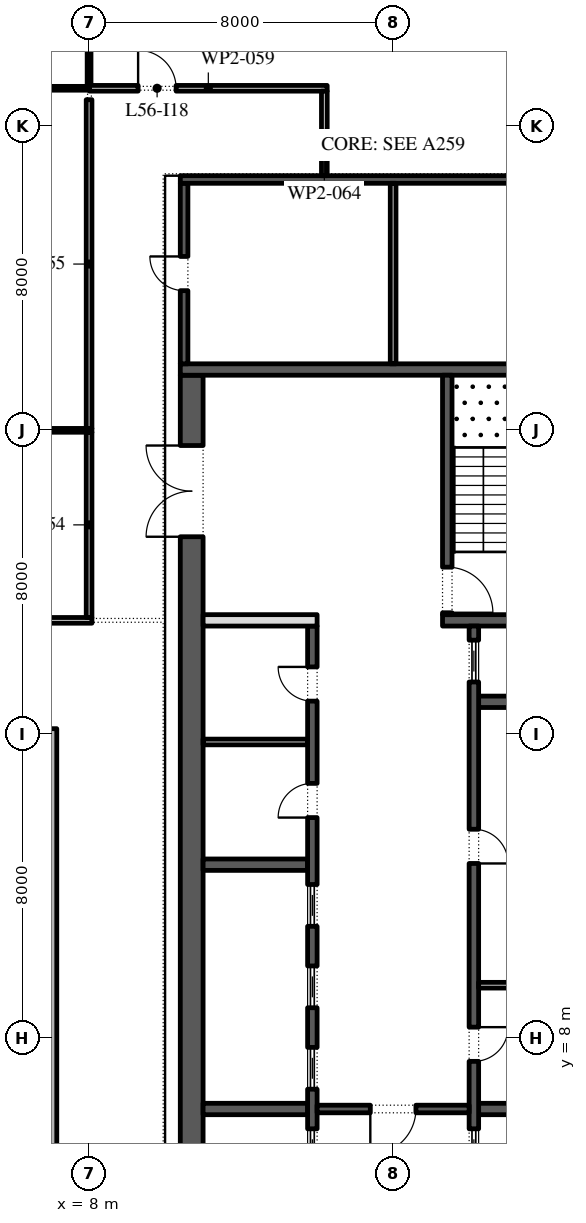
"""IFC4 building model, lengths in metres.
Left out: names, types, materials, properties, quantities, classifications, styles, units other than length and angle.
Written with IfcOpenShell. Run it as: python <this file> out.ifc"""

import sys

from ifc_helpers import new_model, si_unit, direction, frame, frame_2d, origin, place, context, subcontext, project, spatial, polyline, rectangle, outline, extrude, element, fill, save


model = new_model("IFC4")
c1 = context("Model", 3, precision=1e-05, world=origin(), true_north=direction((0.0, 1.0)))
c2 = subcontext(c1, "Body", "Model", "MODEL_VIEW")
j1 = project(units=[si_unit("LENGTHUNIT", "METRE"), si_unit("PLANEANGLEUNIT", "RADIAN")], contexts=[c1])
p1 = place(None, origin())
s1 = spatial("IfcSite", under=j1, at=p1, CompositionType="ELEMENT")
p2 = place(p1, origin())
s2 = spatial("IfcBuilding", under=s1, at=p2, CompositionType="ELEMENT")
p3 = place(p2, frame((0.0, 0.0, 259.8)))
s3 = spatial("IfcBuildingStorey", under=s2, at=p3, CompositionType="ELEMENT", Elevation=259.8)
p4 = place(p3, origin())
e1 = element("IfcWall", 1, at=p4, inside=s3, PredefinedType="STANDARD", context=c2, shape_type="SweptSolid", body=[
    extrude(outline(polyline([(-7.15, -2.15), (7.15, -2.15), (7.15, 16.15), (-7.15, 16.15), (-7.15, -2.15)]), holes=[polyline([(-7.0, -2.0), (-7.0, 16.0), (7.0, 16.0), (7.0, -2.0), (-7.0, -2.0)])]), origin(), (0.0, 0.0, 1.0), 4.0),
])
p5 = place(p3, frame((10.7, -2.45, 0.0), z_axis=(0.0, 0.0, 1.0), x_axis=(0.0, 1.0, 0.0)))
e2 = element("IfcWall", 2, at=p5, inside=s3, PredefinedType="SHEAR", context=c2, shape_type="SweptSolid", body=[
    extrude(rectangle(XDim=27.9, YDim=0.6, at=frame_2d((13.95, 0.0))), origin(), (0.0, 0.0, 1.0), 4.0),
])
p6 = place(p5, frame((23.65, 0.0, 0.0)))
e3 = element("IfcOpeningElement", 3, at=p6, cuts=e2, PredefinedType="OPENING", context=c2, shape_type="SweptSolid", body=[
    extrude(rectangle(XDim=2.4, YDim=2.1, at=frame_2d((1.2, 1.05))), frame((0.0, 0.31, 0.0), z_axis=(0.0, -1.0, 0.0), x_axis=(1.0, 0.0, 0.0)), (0.0, 0.0, 1.0), 0.62),
])
p7 = place(p5, frame((1.087, 0.0, 0.0)))
e4 = element("IfcOpeningElement", 4, at=p7, cuts=e2, PredefinedType="OPENING", context=c2, shape_type="SweptSolid", body=[
    extrude(rectangle(XDim=0.9, YDim=2.1, at=frame_2d((0.45, 1.05))), frame((0.0, 0.31, 0.0), z_axis=(0.0, -1.0, 0.0), x_axis=(1.0, 0.0, 0.0)), (0.0, 0.0, 1.0), 0.62),
])
p8 = place(p5, frame((4.262, 0.0, 0.0)))
e5 = element("IfcOpeningElement", 5, at=p8, cuts=e2, PredefinedType="OPENING", context=c2, shape_type="SweptSolid", body=[
    extrude(rectangle(XDim=1.0, YDim=2.1, at=frame_2d((0.5, 1.05))), frame((0.0, 0.31, 0.0), z_axis=(0.0, -1.0, 0.0), x_axis=(1.0, 0.0, 0.0)), (0.0, 0.0, 1.0), 0.62),
])
p9 = place(p3, frame((10.4, 25.6, 0.0), z_axis=(0.0, 0.0, 1.0), x_axis=(1.0, 0.0, 0.0)))
e6 = element("IfcWall", 6, at=p9, inside=s3, PredefinedType="SHEAR", context=c2, shape_type="SweptSolid", body=[
    extrude(rectangle(XDim=11.2, YDim=0.3, at=frame_2d((5.6, 0.0))), origin(), (0.0, 0.0, 1.0), 4.0),
])
p10 = place(p3, frame((17.3, 19.0, 0.0), z_axis=(0.0, 0.0, 1.0), x_axis=(1.0, 0.0, 0.0)))
e7 = element("IfcWall", 7, at=p10, inside=s3, PredefinedType="SHEAR", context=c2, shape_type="SweptSolid", body=[
    extrude(rectangle(XDim=3.7, YDim=0.3, at=frame_2d((1.85, 0.0))), origin(), (0.0, 0.0, 1.0), 4.0),
])
p11 = place(p3, frame((17.425, 19.15, 0.0), z_axis=(0.0, 0.0, 1.0), x_axis=(0.0, 1.0, 0.0)))
e8 = element("IfcWall", 8, at=p11, inside=s3, PredefinedType="SHEAR", context=c2, shape_type="SweptSolid", body=[
    extrude(rectangle(XDim=6.3, YDim=0.25, at=frame_2d((3.15, 0.0))), origin(), (0.0, 0.0, 1.0), 4.0),
])
p12 = place(p11, frame((0.05, 0.0, 0.0)))
e9 = element("IfcOpeningElement", 9, at=p12, cuts=e8, PredefinedType="OPENING", context=c2, shape_type="SweptSolid", body=[
    extrude(rectangle(XDim=1.2, YDim=2.1, at=frame_2d((0.6, 1.05))), frame((0.0, 0.135, 0.0), z_axis=(0.0, -1.0, 0.0), x_axis=(1.0, 0.0, 0.0)), (0.0, 0.0, 1.0), 0.27),
])
for number, where, z_axis, x_axis in (
    (10, (18.25, 6.143, 0.0), (0.0, 0.0, 1.0), (1.0, 0.0, 0.0)),
    (11, (18.25, 16.857, 0.0), (0.0, 0.0, 1.0), (1.0, 0.0, 0.0)),
):
    element("IfcWall", number, at=place(p3, frame(where, z_axis=z_axis, x_axis=x_axis)), inside=s3, PredefinedType="SHEAR", context=c2, shape_type="SweptSolid", body=[
        extrude(rectangle(XDim=2.75, YDim=0.3, at=frame_2d((1.375, 0.0))), origin(), (0.0, 0.0, 1.0), 4.0),
    ])
p13 = place(p3, frame((18.125, 4.15, 0.0), z_axis=(0.0, 0.0, 1.0), x_axis=(0.0, 1.0, 0.0)))
e12 = element("IfcWall", 12, at=p13, inside=s3, PredefinedType="SHEAR", context=c2, shape_type="SweptSolid", body=[
    extrude(rectangle(XDim=14.7, YDim=0.25, at=frame_2d((7.35, 0.0))), origin(), (0.0, 0.0, 1.0), 4.0),
])
p14 = place(p13, frame((3.246, 0.0, 0.0)))
e13 = element("IfcOpeningElement", 13, at=p14, cuts=e12, PredefinedType="OPENING", context=c2, shape_type="SweptSolid", body=[
    extrude(rectangle(XDim=0.9, YDim=2.1, at=frame_2d((0.45, 1.05))), frame((0.0, 0.135, 0.0), z_axis=(0.0, -1.0, 0.0), x_axis=(1.0, 0.0, 0.0)), (0.0, 0.0, 1.0), 0.27),
])
p15 = place(p13, frame((8.454, 0.0, 0.0)))
e14 = element("IfcOpeningElement", 14, at=p15, cuts=e12, PredefinedType="OPENING", context=c2, shape_type="SweptSolid", body=[
    extrude(rectangle(XDim=0.9, YDim=2.1, at=frame_2d((0.45, 1.05))), frame((0.0, 0.135, 0.0), z_axis=(0.0, -1.0, 0.0), x_axis=(1.0, 0.0, 0.0)), (0.0, 0.0, 1.0), 0.27),
])
p16 = place(p13, frame((0.371, 0.0, 0.0)))
e15 = element("IfcOpeningElement", 15, at=p16, cuts=e12, PredefinedType="OPENING", context=c2, shape_type="SweptSolid", body=[
    extrude(rectangle(XDim=1.1, YDim=2.1, at=frame_2d((0.55, 1.05))), frame((0.0, 0.135, 0.0), z_axis=(0.0, -1.0, 0.0), x_axis=(1.0, 0.0, 0.0)), (0.0, 0.0, 1.0), 0.27),
])
p17 = place(p13, frame((13.229, 0.0, 0.0)))
e16 = element("IfcOpeningElement", 16, at=p17, cuts=e12, PredefinedType="OPENING", context=c2, shape_type="SweptSolid", body=[
    extrude(rectangle(XDim=1.1, YDim=2.1, at=frame_2d((0.55, 1.05))), frame((0.0, 0.135, 0.0), z_axis=(0.0, -1.0, 0.0), x_axis=(1.0, 0.0, 0.0)), (0.0, 0.0, 1.0), 0.27),
])
p18 = place(p3, frame((18.25, 9.4, 0.0), z_axis=(0.0, 0.0, 1.0), x_axis=(1.0, 0.0, 0.0)))
e17 = element("IfcWall", 17, at=p18, inside=s3, PredefinedType="PARTITIONING", context=c2, shape_type="SweptSolid", body=[
    extrude(rectangle(XDim=2.75, YDim=0.15, at=frame_2d((1.375, 0.0))), origin(), (0.0, 0.0, 1.0), 4.0),
])
for number, where, z_axis, x_axis in (
    (18, (11.0, 6.143, 0.0), (0.0, 0.0, 1.0), (1.0, 0.0, 0.0)),
    (19, (11.0, 12.571, 0.0), (0.0, 0.0, 1.0), (1.0, 0.0, 0.0)),
):
    element("IfcWall", number, at=place(p3, frame(where, z_axis=z_axis, x_axis=x_axis)), inside=s3, PredefinedType="SHEAR", context=c2, shape_type="SweptSolid", body=[
        extrude(rectangle(XDim=2.75, YDim=0.3, at=frame_2d((1.375, 0.0))), origin(), (0.0, 0.0, 1.0), 4.0),
    ])
p19 = place(p3, frame((13.875, -2.45, 0.0), z_axis=(0.0, 0.0, 1.0), x_axis=(0.0, 1.0, 0.0)))
e20 = element("IfcWall", 20, at=p19, inside=s3, PredefinedType="SHEAR", context=c2, shape_type="SweptSolid", body=[
    extrude(rectangle(XDim=21.3, YDim=0.25, at=frame_2d((10.65, 0.0))), origin(), (0.0, 0.0, 1.0), 4.0),
])
p20 = place(p19, frame((16.261, 0.0, 0.0)))
e21 = element("IfcOpeningElement", 21, at=p20, cuts=e20, PredefinedType="OPENING", context=c2, shape_type="SweptSolid", body=[
    extrude(rectangle(XDim=0.9, YDim=2.1, at=frame_2d((0.45, 1.05))), frame((0.0, 0.135, 0.0), z_axis=(0.0, -1.0, 0.0), x_axis=(1.0, 0.0, 0.0)), (0.0, 0.0, 1.0), 0.27),
])
p21 = place(p19, frame((19.325, 0.0, 0.0)))
e22 = element("IfcOpeningElement", 22, at=p21, cuts=e20, PredefinedType="OPENING", context=c2, shape_type="SweptSolid", body=[
    extrude(rectangle(XDim=0.9, YDim=2.1, at=frame_2d((0.45, 1.05))), frame((0.0, 0.135, 0.0), z_axis=(0.0, -1.0, 0.0), x_axis=(1.0, 0.0, 0.0)), (0.0, 0.0, 1.0), 0.27),
])
p22 = place(p19, frame((6.971, 0.0, 0.0)))
e23 = element("IfcOpeningElement", 23, at=p22, cuts=e20, PredefinedType="OPENING", context=c2, shape_type="SweptSolid", body=[
    extrude(rectangle(XDim=1.1, YDim=2.1, at=frame_2d((0.55, 1.05))), frame((0.0, 0.135, 0.0), z_axis=(0.0, -1.0, 0.0), x_axis=(1.0, 0.0, 0.0)), (0.0, 0.0, 1.0), 0.27),
])
p23 = place(p19, frame((9.114, 0.0, 0.0)))
e24 = element("IfcOpeningElement", 24, at=p23, cuts=e20, PredefinedType="OPENING", context=c2, shape_type="SweptSolid", body=[
    extrude(rectangle(XDim=1.1, YDim=2.1, at=frame_2d((0.55, 1.05))), frame((0.0, 0.135, 0.0), z_axis=(0.0, -1.0, 0.0), x_axis=(1.0, 0.0, 0.0)), (0.0, 0.0, 1.0), 0.27),
])
p24 = place(p19, frame((11.257, 0.0, 0.0)))
e25 = element("IfcOpeningElement", 25, at=p24, cuts=e20, PredefinedType="OPENING", context=c2, shape_type="SweptSolid", body=[
    extrude(rectangle(XDim=1.1, YDim=2.1, at=frame_2d((0.55, 1.05))), frame((0.0, 0.135, 0.0), z_axis=(0.0, -1.0, 0.0), x_axis=(1.0, 0.0, 0.0)), (0.0, 0.0, 1.0), 0.27),
])
p25 = place(p19, frame((13.4, 0.0, 0.0)))
e26 = element("IfcOpeningElement", 26, at=p25, cuts=e20, PredefinedType="OPENING", context=c2, shape_type="SweptSolid", body=[
    extrude(rectangle(XDim=1.1, YDim=2.1, at=frame_2d((0.55, 1.05))), frame((0.0, 0.135, 0.0), z_axis=(0.0, -1.0, 0.0), x_axis=(1.0, 0.0, 0.0)), (0.0, 0.0, 1.0), 0.27),
])
p26 = place(p3, frame((11.0, 19.0, 0.0), z_axis=(0.0, 0.0, 1.0), x_axis=(1.0, 0.0, 0.0)))
e27 = element("IfcWall", 27, at=p26, inside=s3, PredefinedType="PARTITIONING", context=c2, shape_type="SweptSolid", body=[
    extrude(rectangle(XDim=3.0, YDim=0.3, at=frame_2d((1.5, 0.0))), origin(), (0.0, 0.0, 1.0), 4.0),
])
p27 = place(p3, frame((11.0, 15.8, 0.0), z_axis=(0.0, 0.0, 1.0), x_axis=(1.0, 0.0, 0.0)))
e28 = element("IfcWall", 28, at=p27, inside=s3, PredefinedType="PARTITIONING", context=c2, shape_type="SweptSolid", body=[
    extrude(rectangle(XDim=2.75, YDim=0.15, at=frame_2d((1.375, 0.0))), origin(), (0.0, 0.0, 1.0), 4.0),
])
p28 = place(p3, frame((14.0, 6.143, 0.0), z_axis=(0.0, 0.0, 1.0), x_axis=(1.0, 0.0, 0.0)))
e29 = element("IfcWall", 29, at=p28, inside=s3, PredefinedType="SHEAR", context=c2, shape_type="SweptSolid", body=[
    extrude(rectangle(XDim=4.0, YDim=0.2, at=frame_2d((2.0, 0.0))), origin(), (0.0, 0.0, 1.0), 4.0),
])
p29 = place(p28, frame((1.4, 0.0, 0.0)))
e30 = element("IfcOpeningElement", 30, at=p29, cuts=e29, PredefinedType="OPENING", context=c2, shape_type="SweptSolid", body=[
    extrude(rectangle(XDim=1.2, YDim=2.1, at=frame_2d((0.6, 1.05))), frame((0.0, 0.11, 0.0), z_axis=(0.0, -1.0, 0.0), x_axis=(1.0, 0.0, 0.0)), (0.0, 0.0, 1.0), 0.22),
])
p30 = place(p3, frame((10.5, 25.75, 0.0), z_axis=(0.0, 0.0, 1.0), x_axis=(0.0, 1.0, 0.0)))
e31 = element("IfcWall", 31, at=p30, inside=s3, PredefinedType="SHEAR", context=c2, shape_type="SweptSolid", body=[
    extrude(rectangle(XDim=4.75, YDim=0.2, at=frame_2d((2.375, 0.0))), origin(), (0.0, 0.0, 1.0), 4.0),
])
p31 = place(p30, frame((1.925, 0.0, 0.0)))
e32 = element("IfcOpeningElement", 32, at=p31, cuts=e31, PredefinedType="OPENING", context=c2, shape_type="SweptSolid", body=[
    extrude(rectangle(XDim=0.9, YDim=2.1, at=frame_2d((0.45, 1.05))), frame((0.0, 0.11, 0.0), z_axis=(0.0, -1.0, 0.0), x_axis=(1.0, 0.0, 0.0)), (0.0, 0.0, 1.0), 0.22),
])
p32 = place(p3, frame((10.4, 30.6, 0.0), z_axis=(0.0, 0.0, 1.0), x_axis=(1.0, 0.0, 0.0)))
e33 = element("IfcWall", 33, at=p32, inside=s3, PredefinedType="SHEAR", context=c2, shape_type="SweptSolid", body=[
    extrude(rectangle(XDim=11.2, YDim=0.2, at=frame_2d((5.6, 0.0))), origin(), (0.0, 0.0, 1.0), 4.0),
])
p33 = place(p3, frame((16.0, 25.75, 0.0), z_axis=(0.0, 0.0, 1.0), x_axis=(0.0, 1.0, 0.0)))
e34 = element("IfcWall", 34, at=p33, inside=s3, PredefinedType="PARTITIONING", context=c2, shape_type="SweptSolid", body=[
    extrude(rectangle(XDim=4.75, YDim=0.15, at=frame_2d((2.375, 0.0))), origin(), (0.0, 0.0, 1.0), 4.0),
])
p34 = place(p3, frame((1.025, 19.0, 0.0), z_axis=(0.0, 0.0, 1.0), x_axis=(1.0, 0.0, 0.0)))
e35 = element("IfcWall", 35, at=p34, inside=s3, PredefinedType="PARTITIONING", context=c2, shape_type="SweptSolid", body=[
    extrude(rectangle(XDim=7.05, YDim=0.15, at=frame_2d((3.525, 0.0))), origin(), (0.0, 0.0, 1.0), 4.0),
])
p35 = place(p34, frame((3.825, 0.0, 0.0)))
e36 = element("IfcOpeningElement", 36, at=p35, cuts=e35, PredefinedType="OPENING", context=c2, shape_type="SweptSolid", body=[
    extrude(rectangle(XDim=1.0, YDim=2.1, at=frame_2d((0.5, 1.05))), frame((0.0, 0.085, 0.0), z_axis=(0.0, -1.0, 0.0), x_axis=(1.0, 0.0, 0.0)), (0.0, 0.0, 1.0), 0.17),
])
p36 = place(p3, frame((1.175, 24.0, 0.0), z_axis=(0.0, 0.0, 1.0), x_axis=(1.0, 0.0, 0.0)))
e37 = element("IfcWall", 37, at=p36, inside=s3, PredefinedType="PARTITIONING", context=c2, shape_type="SweptSolid", body=[
    extrude(rectangle(XDim=6.9, YDim=0.1, at=frame_2d((3.45, 0.0))), origin(), (0.0, 0.0, 1.0), 4.0),
])
p37 = place(p3, frame((8.0, 19.075, 0.0), z_axis=(0.0, 0.0, 1.0), x_axis=(0.0, 1.0, 0.0)))
e38 = element("IfcWall", 38, at=p37, inside=s3, PredefinedType="PARTITIONING", context=c2, shape_type="SweptSolid", body=[
    extrude(rectangle(XDim=4.875, YDim=0.15, at=frame_2d((2.438, 0.0))), origin(), (0.0, 0.0, 1.0), 4.0),
])
p38 = place(p3, frame((8.0, 24.05, 0.0), z_axis=(0.0, 0.0, 1.0), x_axis=(0.0, 1.0, 0.0)))
e39 = element("IfcWall", 39, at=p38, inside=s3, PredefinedType="PARTITIONING", context=c2, shape_type="SweptSolid", body=[
    extrude(rectangle(XDim=8.65, YDim=0.15, at=frame_2d((4.325, 0.0))), origin(), (0.0, 0.0, 1.0), 4.0),
])
p39 = place(p3, frame((8.05, 33.0, 0.0), z_axis=(0.0, 0.0, 1.0), x_axis=(-1.0, 0.0, 0.0)))
e40 = element("IfcWall", 40, at=p39, inside=s3, PredefinedType="PARTITIONING", context=c2, shape_type="SweptSolid", body=[
    extrude(rectangle(XDim=6.875, YDim=0.1, at=frame_2d((3.438, 0.0))), origin(), (0.0, 0.0, 1.0), 4.0),
])
p40 = place(p3, frame((8.0, 33.05, 0.0), z_axis=(0.0, 0.0, 1.0), x_axis=(0.0, 1.0, 0.0)))
e41 = element("IfcWall", 41, at=p40, inside=s3, PredefinedType="PARTITIONING", context=c2, shape_type="SweptSolid", body=[
    extrude(rectangle(XDim=6.5, YDim=0.1, at=frame_2d((3.25, 0.0))), origin(), (0.0, 0.0, 1.0), 4.0),
])
p41 = place(p3, frame((8.01, 33.0, 0.0), z_axis=(0.0, 0.0, 1.0), x_axis=(1.0, 0.0, 0.0)))
e42 = element("IfcWall", 42, at=p41, inside=s3, PredefinedType="PARTITIONING", context=c2, shape_type="SweptSolid", body=[
    extrude(rectangle(XDim=6.255, YDim=0.15, at=frame_2d((3.127, 0.0))), origin(), (0.0, 0.0, 1.0), 4.0),
])
p42 = place(p41, frame((1.28, 0.0, 0.0)))
e43 = element("IfcOpeningElement", 43, at=p42, cuts=e42, PredefinedType="OPENING", context=c2, shape_type="SweptSolid", body=[
    extrude(rectangle(XDim=1.0, YDim=2.1, at=frame_2d((0.5, 1.05))), frame((0.0, 0.085, 0.0), z_axis=(0.0, -1.0, 0.0), x_axis=(1.0, 0.0, 0.0)), (0.0, 0.0, 1.0), 0.17),
])
p43 = place(p3, frame((14.19, 32.925, 0.0), z_axis=(0.0, 0.0, 1.0), x_axis=(0.0, -1.0, 0.0)))
e44 = element("IfcWall", 44, at=p43, inside=s3, PredefinedType="PARTITIONING", context=c2, shape_type="SweptSolid", body=[
    extrude(rectangle(XDim=2.225, YDim=0.15, at=frame_2d((1.113, 0.0))), origin(), (0.0, 0.0, 1.0), 4.0),
])
p44 = place(p14, frame((0.9, -0.2, 0.0), z_axis=(0.0, 0.0, 1.0), x_axis=(-1.0, 0.0, 0.0)))
e45 = element("IfcDoor", 45, at=p44, inside=s3, OperationType="SINGLE_SWING_RIGHT", PredefinedType="DOOR", context=c2, shape_type="SweptSolid", body=[
    extrude(rectangle(XDim=0.9, YDim=2.1, at=frame_2d((0.45, 1.05))), frame((0.0, -0.075, 0.0), z_axis=(0.0, -1.0, 0.0), x_axis=(1.0, 0.0, 0.0)), (0.0, 0.0, 1.0), 0.05),
])
fill(e13, e45)
p45 = place(p15, frame((0.9, -0.2, 0.0), z_axis=(0.0, 0.0, 1.0), x_axis=(-1.0, 0.0, 0.0)))
e46 = element("IfcDoor", 46, at=p45, inside=s3, OperationType="SINGLE_SWING_LEFT", PredefinedType="DOOR", context=c2, shape_type="SweptSolid", body=[
    extrude(rectangle(XDim=0.9, YDim=2.1, at=frame_2d((0.45, 1.05))), frame((0.0, -0.075, 0.0), z_axis=(0.0, -1.0, 0.0), x_axis=(1.0, 0.0, 0.0)), (0.0, 0.0, 1.0), 0.05),
])
fill(e14, e46)
p46 = place(p16, origin())
e47 = element("IfcDoor", 47, at=p46, inside=s3, OperationType="SLIDING_TO_LEFT", PredefinedType="DOOR", context=c2, shape_type="SweptSolid", body=[
    extrude(rectangle(XDim=1.1, YDim=2.1, at=frame_2d((0.55, 1.05))), frame((0.0, 0.025, 0.0), z_axis=(0.0, -1.0, 0.0), x_axis=(1.0, 0.0, 0.0)), (0.0, 0.0, 1.0), 0.05),
])
fill(e15, e47)
p47 = place(p17, origin())
e48 = element("IfcDoor", 48, at=p47, inside=s3, OperationType="SLIDING_TO_LEFT", PredefinedType="DOOR", context=c2, shape_type="SweptSolid", body=[
    extrude(rectangle(XDim=1.1, YDim=2.1, at=frame_2d((0.55, 1.05))), frame((0.0, 0.025, 0.0), z_axis=(0.0, -1.0, 0.0), x_axis=(1.0, 0.0, 0.0)), (0.0, 0.0, 1.0), 0.05),
])
fill(e16, e48)
p48 = place(p20, origin())
e49 = element("IfcDoor", 49, at=p48, inside=s3, OperationType="SINGLE_SWING_RIGHT", PredefinedType="DOOR", context=c2, shape_type="SweptSolid", body=[
    extrude(rectangle(XDim=0.9, YDim=2.1, at=frame_2d((0.45, 1.05))), frame((0.0, 0.125, 0.0), z_axis=(0.0, -1.0, 0.0), x_axis=(1.0, 0.0, 0.0)), (0.0, 0.0, 1.0), 0.05),
])
fill(e21, e49)
p49 = place(p21, origin())
e50 = element("IfcDoor", 50, at=p49, inside=s3, OperationType="SINGLE_SWING_LEFT", PredefinedType="DOOR", context=c2, shape_type="SweptSolid", body=[
    extrude(rectangle(XDim=0.9, YDim=2.1, at=frame_2d((0.45, 1.05))), frame((0.0, 0.125, 0.0), z_axis=(0.0, -1.0, 0.0), x_axis=(1.0, 0.0, 0.0)), (0.0, 0.0, 1.0), 0.05),
])
fill(e22, e50)
p50 = place(p22, origin())
e51 = element("IfcDoor", 51, at=p50, inside=s3, OperationType="SLIDING_TO_LEFT", PredefinedType="DOOR", context=c2, shape_type="SweptSolid", body=[
    extrude(rectangle(XDim=1.1, YDim=2.1, at=frame_2d((0.55, 1.05))), frame((0.0, 0.025, 0.0), z_axis=(0.0, -1.0, 0.0), x_axis=(1.0, 0.0, 0.0)), (0.0, 0.0, 1.0), 0.05),
])
fill(e23, e51)
p51 = place(p23, origin())
e52 = element("IfcDoor", 52, at=p51, inside=s3, OperationType="SLIDING_TO_LEFT", PredefinedType="DOOR", context=c2, shape_type="SweptSolid", body=[
    extrude(rectangle(XDim=1.1, YDim=2.1, at=frame_2d((0.55, 1.05))), frame((0.0, 0.025, 0.0), z_axis=(0.0, -1.0, 0.0), x_axis=(1.0, 0.0, 0.0)), (0.0, 0.0, 1.0), 0.05),
])
fill(e24, e52)
p52 = place(p24, origin())
e53 = element("IfcDoor", 53, at=p52, inside=s3, OperationType="SLIDING_TO_LEFT", PredefinedType="DOOR", context=c2, shape_type="SweptSolid", body=[
    extrude(rectangle(XDim=1.1, YDim=2.1, at=frame_2d((0.55, 1.05))), frame((0.0, 0.025, 0.0), z_axis=(0.0, -1.0, 0.0), x_axis=(1.0, 0.0, 0.0)), (0.0, 0.0, 1.0), 0.05),
])
fill(e25, e53)
p53 = place(p25, origin())
e54 = element("IfcDoor", 54, at=p53, inside=s3, OperationType="SLIDING_TO_LEFT", PredefinedType="DOOR", context=c2, shape_type="SweptSolid", body=[
    extrude(rectangle(XDim=1.1, YDim=2.1, at=frame_2d((0.55, 1.05))), frame((0.0, 0.025, 0.0), z_axis=(0.0, -1.0, 0.0), x_axis=(1.0, 0.0, 0.0)), (0.0, 0.0, 1.0), 0.05),
])
fill(e26, e54)
p54 = place(p29, frame((1.2, 0.0, 0.0), z_axis=(0.0, 0.0, 1.0), x_axis=(-1.0, 0.0, 0.0)))
e55 = element("IfcDoor", 55, at=p54, inside=s3, OperationType="SINGLE_SWING_LEFT", PredefinedType="DOOR", context=c2, shape_type="SweptSolid", body=[
    extrude(rectangle(XDim=1.2, YDim=2.1, at=frame_2d((0.6, 1.05))), frame((0.0, 0.025, 0.0), z_axis=(0.0, -1.0, 0.0), x_axis=(1.0, 0.0, 0.0)), (0.0, 0.0, 1.0), 0.05),
])
fill(e30, e55)
p55 = place(p6, origin())
e56 = element("IfcDoor", 56, at=p55, inside=s3, OperationType="DOUBLE_DOOR_SINGLE_SWING", PredefinedType="DOOR", context=c2, shape_type="SweptSolid", body=[
    extrude(rectangle(XDim=2.4, YDim=2.1, at=frame_2d((1.2, 1.05))), frame((0.0, 0.025, 0.0), z_axis=(0.0, -1.0, 0.0), x_axis=(1.0, 0.0, 0.0)), (0.0, 0.0, 1.0), 0.05),
])
fill(e3, e56)
p56 = place(p12, frame((1.2, 0.0, 0.0), z_axis=(0.0, 0.0, 1.0), x_axis=(-1.0, 0.0, 0.0)))
e57 = element("IfcDoor", 57, at=p56, inside=s3, OperationType="SINGLE_SWING_LEFT", PredefinedType="DOOR", context=c2, shape_type="SweptSolid", body=[
    extrude(rectangle(XDim=1.2, YDim=2.1, at=frame_2d((0.6, 1.05))), frame((0.0, 0.025, 0.0), z_axis=(0.0, -1.0, 0.0), x_axis=(1.0, 0.0, 0.0)), (0.0, 0.0, 1.0), 0.05),
])
fill(e9, e57)
p57 = place(p31, origin())
e58 = element("IfcDoor", 58, at=p57, inside=s3, OperationType="SINGLE_SWING_LEFT", PredefinedType="DOOR", context=c2, shape_type="SweptSolid", body=[
    extrude(rectangle(XDim=0.9, YDim=2.1, at=frame_2d((0.45, 1.05))), frame((0.0, -0.05, 0.0), z_axis=(0.0, -1.0, 0.0), x_axis=(1.0, 0.0, 0.0)), (0.0, 0.0, 1.0), 0.05),
])
fill(e32, e58)
p58 = place(p42, origin())
e59 = element("IfcDoor", 59, at=p58, inside=s3, OperationType="SINGLE_SWING_RIGHT", PredefinedType="DOOR", context=c2, shape_type="SweptSolid", body=[
    extrude(rectangle(XDim=1.0, YDim=2.1, at=frame_2d((0.5, 1.05))), frame((0.0, 0.025, 0.0), z_axis=(0.0, -1.0, 0.0), x_axis=(1.0, 0.0, 0.0)), (0.0, 0.0, 1.0), 0.05),
])
fill(e43, e59)
save(model, sys.argv[1])
